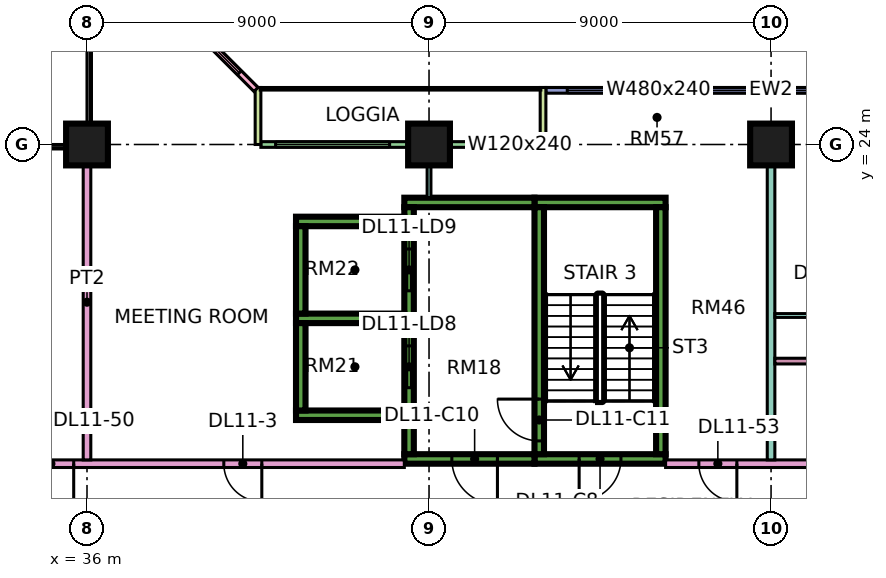
"""IFC4 building model, lengths in metres.
Left out: names, types, materials, properties, quantities, classifications, styles, units other than length and angle.
Written with IfcOpenShell. Run it as: python <this file> out.ifc"""

import sys

from ifc_helpers import new_model, si_unit, direction, frame, frame_2d, origin, origin_2d, place, context, subcontext, project, spatial, rectangle, extrude, element, fill, save


model = new_model("IFC4")
c1 = context("Model", 3, precision=1e-05, world=origin(), true_north=direction((0.0, 1.0)))
c2 = subcontext(c1, "Body", "Model", "MODEL_VIEW")
j1 = project(units=[si_unit("LENGTHUNIT", "METRE"), si_unit("PLANEANGLEUNIT", "RADIAN")], contexts=[c1])
p1 = place(None, origin())
s1 = spatial("IfcSite", under=j1, at=p1, CompositionType="ELEMENT")
p2 = place(p1, origin())
s2 = spatial("IfcBuilding", under=s1, at=p2, CompositionType="ELEMENT")
p3 = place(p2, frame((0.0, 0.0, 56.4)))
s3 = spatial("IfcBuildingStorey", under=s2, at=p3, CompositionType="ELEMENT", Elevation=56.4)
for number, where, z_axis, x_axis in (
    (1, (36.0, 24.0, 0.0), (0.0, 0.0, 1.0), (1.0, 0.0, 0.0)),
    (2, (45.0, 24.0, 0.0), (0.0, 0.0, 1.0), (1.0, 0.0, 0.0)),
    (3, (54.0, 24.0, 0.0), (0.0, 0.0, 1.0), (1.0, 0.0, 0.0)),
):
    element("IfcColumn", number, at=place(p3, frame(where, z_axis=z_axis, x_axis=x_axis)), inside=s3, PredefinedType="COLUMN", context=c2, shape_type="SweptSolid", body=[
        extrude(rectangle(XDim=1.1, YDim=1.1, at=origin_2d()), origin(), (0.0, 0.0, 1.0), 3.75),
    ])
p4 = place(p3, frame((47.775, 15.725, 0.0), z_axis=(0.0, 0.0, 1.0), x_axis=(1.0, 0.0, 0.0)))
e4 = element("IfcWall", 4, at=p4, inside=s3, PredefinedType="SHEAR", context=c2, shape_type="SweptSolid", body=[
    extrude(rectangle(XDim=3.45, YDim=0.25, at=frame_2d((1.725, 0.0))), origin(), (0.0, 0.0, 1.0), 3.75),
])
p5 = place(p4, frame((1.175, 0.0, 0.0)))
e5 = element("IfcOpeningElement", 5, at=p5, cuts=e4, PredefinedType="OPENING", context=c2, shape_type="SweptSolid", body=[
    extrude(rectangle(XDim=1.1, YDim=2.2, at=frame_2d((0.55, 1.1))), frame((0.0, 0.135, 0.0), z_axis=(0.0, -1.0, 0.0), x_axis=(1.0, 0.0, 0.0)), (0.0, 0.0, 1.0), 0.27),
])
p6 = place(p3, frame((47.775, 22.475, 0.0), z_axis=(0.0, 0.0, 1.0), x_axis=(1.0, 0.0, 0.0)))
e6 = element("IfcWall", 6, at=p6, inside=s3, PredefinedType="SHEAR", context=c2, shape_type="SweptSolid", body=[
    extrude(rectangle(XDim=3.45, YDim=0.25, at=frame_2d((1.725, 0.0))), origin(), (0.0, 0.0, 1.0), 3.75),
])
p7 = place(p3, frame((47.9, 15.85, 0.0), z_axis=(0.0, 0.0, 1.0), x_axis=(0.0, 1.0, 0.0)))
e7 = element("IfcWall", 7, at=p7, inside=s3, PredefinedType="SHEAR", context=c2, shape_type="SweptSolid", body=[
    extrude(rectangle(XDim=6.5, YDim=0.25, at=frame_2d((3.25, 0.0))), origin(), (0.0, 0.0, 1.0), 3.75),
])
p8 = place(p7, frame((0.35, 0.0, 0.0)))
e8 = element("IfcOpeningElement", 8, at=p8, cuts=e7, PredefinedType="OPENING", context=c2, shape_type="SweptSolid", body=[
    extrude(rectangle(XDim=1.1, YDim=2.2, at=frame_2d((0.55, 1.1))), frame((0.0, 0.135, 0.0), z_axis=(0.0, -1.0, 0.0), x_axis=(1.0, 0.0, 0.0)), (0.0, 0.0, 1.0), 0.27),
])
p9 = place(p3, frame((51.1, 15.85, 0.0), z_axis=(0.0, 0.0, 1.0), x_axis=(0.0, 1.0, 0.0)))
e9 = element("IfcWall", 9, at=p9, inside=s3, PredefinedType="SHEAR", context=c2, shape_type="SweptSolid", body=[
    extrude(rectangle(XDim=6.5, YDim=0.25, at=frame_2d((3.25, 0.0))), origin(), (0.0, 0.0, 1.0), 3.75),
])
p10 = place(p3, frame((44.35, 15.725, 0.0), z_axis=(0.0, 0.0, 1.0), x_axis=(1.0, 0.0, 0.0)))
e10 = element("IfcWall", 10, at=p10, inside=s3, PredefinedType="SHEAR", context=c2, shape_type="SweptSolid", body=[
    extrude(rectangle(XDim=3.425, YDim=0.25, at=frame_2d((1.712, 0.0))), origin(), (0.0, 0.0, 1.0), 3.75),
])
p11 = place(p10, frame((1.25, 0.0, 0.0)))
e11 = element("IfcOpeningElement", 11, at=p11, cuts=e10, PredefinedType="OPENING", context=c2, shape_type="SweptSolid", body=[
    extrude(rectangle(XDim=1.2, YDim=2.2, at=frame_2d((0.6, 1.1))), frame((0.0, 0.135, 0.0), z_axis=(0.0, -1.0, 0.0), x_axis=(1.0, 0.0, 0.0)), (0.0, 0.0, 1.0), 0.27),
])
p12 = place(p3, frame((44.35, 22.475, 0.0), z_axis=(0.0, 0.0, 1.0), x_axis=(1.0, 0.0, 0.0)))
e12 = element("IfcWall", 12, at=p12, inside=s3, PredefinedType="SHEAR", context=c2, shape_type="SweptSolid", body=[
    extrude(rectangle(XDim=3.425, YDim=0.25, at=frame_2d((1.712, 0.0))), origin(), (0.0, 0.0, 1.0), 3.75),
])
p13 = place(p3, frame((44.475, 15.85, 0.0), z_axis=(0.0, 0.0, 1.0), x_axis=(0.0, 1.0, 0.0)))
e13 = element("IfcWall", 13, at=p13, inside=s3, PredefinedType="SHEAR", context=c2, shape_type="SweptSolid", body=[
    extrude(rectangle(XDim=6.5, YDim=0.25, at=frame_2d((3.25, 0.0))), origin(), (0.0, 0.0, 1.0), 3.75),
])
p14 = place(p13, frame((1.75, 0.0, 0.0)))
e14 = element("IfcOpeningElement", 14, at=p14, cuts=e13, PredefinedType="OPENING", context=c2, shape_type="SweptSolid", body=[
    extrude(rectangle(XDim=1.1, YDim=2.2, at=frame_2d((0.55, 1.1))), frame((0.0, 0.135, 0.0), z_axis=(0.0, -1.0, 0.0), x_axis=(1.0, 0.0, 0.0)), (0.0, 0.0, 1.0), 0.27),
])
p15 = place(p13, frame((4.3, 0.0, 0.0)))
e15 = element("IfcOpeningElement", 15, at=p15, cuts=e13, PredefinedType="OPENING", context=c2, shape_type="SweptSolid", body=[
    extrude(rectangle(XDim=1.1, YDim=2.2, at=frame_2d((0.55, 1.1))), frame((0.0, 0.135, 0.0), z_axis=(0.0, -1.0, 0.0), x_axis=(1.0, 0.0, 0.0)), (0.0, 0.0, 1.0), 0.27),
])
for number, where, z_axis, x_axis in (
    (16, (41.5, 16.875, 0.0), (0.0, 0.0, 1.0), (1.0, 0.0, 0.0)),
    (17, (41.5, 19.425, 0.0), (0.0, 0.0, 1.0), (1.0, 0.0, 0.0)),
    (18, (41.5, 21.975, 0.0), (0.0, 0.0, 1.0), (1.0, 0.0, 0.0)),
):
    element("IfcWall", number, at=place(p3, frame(where, z_axis=z_axis, x_axis=x_axis)), inside=s3, PredefinedType="SHEAR", context=c2, shape_type="SweptSolid", body=[
        extrude(rectangle(XDim=2.85, YDim=0.25, at=frame_2d((1.425, 0.0))), origin(), (0.0, 0.0, 1.0), 3.75),
    ])
for number, where, z_axis, x_axis in (
    (19, (41.625, 17.0, 0.0), (0.0, 0.0, 1.0), (0.0, 1.0, 0.0)),
    (20, (41.625, 19.55, 0.0), (0.0, 0.0, 1.0), (0.0, 1.0, 0.0)),
):
    element("IfcWall", number, at=place(p3, frame(where, z_axis=z_axis, x_axis=x_axis)), inside=s3, PredefinedType="SHEAR", context=c2, shape_type="SweptSolid", body=[
        extrude(rectangle(XDim=2.3, YDim=0.25, at=frame_2d((1.15, 0.0))), origin(), (0.0, 0.0, 1.0), 3.75),
    ])
p16 = place(p3, frame((59.925, 25.425, 0.0), z_axis=(0.0, 0.0, 1.0), x_axis=(-1.0, 0.0, 0.0)))
e21 = element("IfcWall", 21, at=p16, inside=s3, PredefinedType="SOLIDWALL", context=c2, shape_type="SweptSolid", body=[
    extrude(rectangle(XDim=11.85, YDim=0.15, at=frame_2d((5.925, 0.0))), origin(), (0.0, 0.0, 1.0), 3.35),
])
p17 = place(p16, frame((0.562, 0.0, 0.45)))
e22 = element("IfcOpeningElement", 22, at=p17, cuts=e21, PredefinedType="OPENING", context=c2, shape_type="SweptSolid", body=[
    extrude(rectangle(XDim=1.8, YDim=2.4, at=frame_2d((0.9, 1.2))), frame((0.0, 0.085, 0.0), z_axis=(0.0, -1.0, 0.0), x_axis=(1.0, 0.0, 0.0)), (0.0, 0.0, 1.0), 0.17),
])
p18 = place(p16, frame((3.525, 0.0, 0.45)))
e23 = element("IfcOpeningElement", 23, at=p18, cuts=e21, PredefinedType="OPENING", context=c2, shape_type="SweptSolid", body=[
    extrude(rectangle(XDim=1.8, YDim=2.4, at=frame_2d((0.9, 1.2))), frame((0.0, 0.085, 0.0), z_axis=(0.0, -1.0, 0.0), x_axis=(1.0, 0.0, 0.0)), (0.0, 0.0, 1.0), 0.17),
])
p19 = place(p16, frame((6.488, 0.0, 0.45)))
e24 = element("IfcOpeningElement", 24, at=p19, cuts=e21, PredefinedType="OPENING", context=c2, shape_type="SweptSolid", body=[
    extrude(rectangle(XDim=4.8, YDim=2.4, at=frame_2d((2.4, 1.2))), frame((0.0, 0.085, 0.0), z_axis=(0.0, -1.0, 0.0), x_axis=(1.0, 0.0, 0.0)), (0.0, 0.0, 1.0), 0.17),
])
p20 = place(p3, frame((47.925, 24.0, 0.0), z_axis=(0.0, 0.0, 1.0), x_axis=(-1.0, 0.0, 0.0)))
e25 = element("IfcWall", 25, at=p20, inside=s3, PredefinedType="SOLIDWALL", context=c2, shape_type="SweptSolid", body=[
    extrude(rectangle(XDim=7.35, YDim=0.15, at=frame_2d((3.675, 0.0))), origin(), (0.0, 0.0, 1.0), 3.35),
])
p21 = place(p20, frame((0.538, 0.0, 0.45)))
e26 = element("IfcOpeningElement", 26, at=p21, cuts=e25, PredefinedType="OPENING", context=c2, shape_type="SweptSolid", body=[
    extrude(rectangle(XDim=1.2, YDim=2.4, at=frame_2d((0.6, 1.2))), frame((0.0, 0.085, 0.0), z_axis=(0.0, -1.0, 0.0), x_axis=(1.0, 0.0, 0.0)), (0.0, 0.0, 1.0), 0.17),
])
p22 = place(p20, frame((3.962, 0.0, 0.45)))
e27 = element("IfcOpeningElement", 27, at=p22, cuts=e25, PredefinedType="OPENING", context=c2, shape_type="SweptSolid", body=[
    extrude(rectangle(XDim=3.0, YDim=2.4, at=frame_2d((1.5, 1.2))), frame((0.0, 0.085, 0.0), z_axis=(0.0, -1.0, 0.0), x_axis=(1.0, 0.0, 0.0)), (0.0, 0.0, 1.0), 0.17),
])
for number, where, z_axis, x_axis in (
    (28, (48.0, 25.5, 0.0), (0.0, 0.0, 1.0), (0.0, -1.0, 0.0)),
    (29, (40.5, 25.5, 0.0), (0.0, 0.0, 1.0), (0.0, -1.0, 0.0)),
):
    element("IfcWall", number, at=place(p3, frame(where, z_axis=z_axis, x_axis=x_axis)), inside=s3, PredefinedType="SOLIDWALL", context=c2, shape_type="SweptSolid", body=[
        extrude(rectangle(XDim=1.5, YDim=0.15, at=frame_2d((0.75, 0.0))), origin(), (0.0, 0.0, 1.0), 3.35),
    ])
p23 = place(p3, frame((40.447, 25.447, 0.0), z_axis=(0.0, 0.0, 1.0), x_axis=(-0.707106781187, 0.707106781187, 0.0)))
e30 = element("IfcWall", 30, at=p23, inside=s3, PredefinedType="SOLIDWALL", context=c2, shape_type="SweptSolid", body=[
    extrude(rectangle(XDim=4.243, YDim=0.15, at=frame_2d((2.121, 0.0))), origin(), (0.0, 0.0, 1.0), 3.35),
])
p24 = place(p23, frame((0.621, 0.0, 0.45)))
e31 = element("IfcOpeningElement", 31, at=p24, cuts=e30, PredefinedType="OPENING", context=c2, shape_type="SweptSolid", body=[
    extrude(rectangle(XDim=3.0, YDim=2.4, at=frame_2d((1.5, 1.2))), frame((0.0, 0.085, 0.0), z_axis=(0.0, -1.0, 0.0), x_axis=(1.0, 0.0, 0.0)), (0.0, 0.0, 1.0), 0.17),
])
p25 = place(p3, frame((34.0, 15.6, 0.0), z_axis=(0.0, 0.0, 1.0), x_axis=(1.0, 0.0, 0.0)))
e32 = element("IfcWall", 32, at=p25, inside=s3, PredefinedType="PARTITIONING", context=c2, shape_type="SweptSolid", body=[
    extrude(rectangle(XDim=10.35, YDim=0.2, at=frame_2d((5.175, 0.0))), origin(), (0.0, 0.0, 1.0), 3.35),
])
p26 = place(p25, frame((5.6, 0.0, 0.0)))
e33 = element("IfcOpeningElement", 33, at=p26, cuts=e32, PredefinedType="OPENING", context=c2, shape_type="SweptSolid", body=[
    extrude(rectangle(XDim=1.0, YDim=2.1, at=frame_2d((0.5, 1.05))), frame((0.0, 0.11, 0.0), z_axis=(0.0, -1.0, 0.0), x_axis=(1.0, 0.0, 0.0)), (0.0, 0.0, 1.0), 0.22),
])
p27 = place(p25, frame((0.45, 0.0, 0.0)))
e34 = element("IfcOpeningElement", 34, at=p27, cuts=e32, PredefinedType="OPENING", context=c2, shape_type="SweptSolid", body=[
    extrude(rectangle(XDim=1.2, YDim=2.1, at=frame_2d((0.6, 1.05))), frame((0.0, 0.11, 0.0), z_axis=(0.0, -1.0, 0.0), x_axis=(1.0, 0.0, 0.0)), (0.0, 0.0, 1.0), 0.22),
])
p28 = place(p3, frame((36.0, 15.7, 0.0), z_axis=(0.0, 0.0, 1.0), x_axis=(0.0, 1.0, 0.0)))
e35 = element("IfcWall", 35, at=p28, inside=s3, PredefinedType="PARTITIONING", context=c2, shape_type="SweptSolid", body=[
    extrude(rectangle(XDim=8.3, YDim=0.2, at=frame_2d((4.15, 0.0))), origin(), (0.0, 0.0, 1.0), 3.35),
])
p29 = place(p3, frame((45.0, 22.6, 0.0), z_axis=(0.0, 0.0, 1.0), x_axis=(0.0, 1.0, 0.0)))
e36 = element("IfcWall", 36, at=p29, inside=s3, PredefinedType="PARTITIONING", context=c2, shape_type="SweptSolid", body=[
    extrude(rectangle(XDim=1.326, YDim=0.1, at=frame_2d((0.663, 0.0))), origin(), (0.0, 0.0, 1.0), 3.35),
])
p30 = place(p3, frame((51.225, 15.6, 0.0), z_axis=(0.0, 0.0, 1.0), x_axis=(1.0, 0.0, 0.0)))
e37 = element("IfcWall", 37, at=p30, inside=s3, PredefinedType="PARTITIONING", context=c2, shape_type="SweptSolid", body=[
    extrude(rectangle(XDim=20.701, YDim=0.2, at=frame_2d((10.351, 0.0))), origin(), (0.0, 0.0, 1.0), 3.35),
])
p31 = place(p30, frame((12.575, 0.0, 0.0)))
e38 = element("IfcOpeningElement", 38, at=p31, cuts=e37, PredefinedType="OPENING", context=c2, shape_type="SweptSolid", body=[
    extrude(rectangle(XDim=1.0, YDim=2.1, at=frame_2d((0.5, 1.05))), frame((0.0, 0.11, 0.0), z_axis=(0.0, -1.0, 0.0), x_axis=(1.0, 0.0, 0.0)), (0.0, 0.0, 1.0), 0.22),
])
p32 = place(p30, frame((0.875, 0.0, 0.0)))
e39 = element("IfcOpeningElement", 39, at=p32, cuts=e37, PredefinedType="OPENING", context=c2, shape_type="SweptSolid", body=[
    extrude(rectangle(XDim=1.0, YDim=2.1, at=frame_2d((0.5, 1.05))), frame((0.0, 0.11, 0.0), z_axis=(0.0, -1.0, 0.0), x_axis=(1.0, 0.0, 0.0)), (0.0, 0.0, 1.0), 0.22),
])
p33 = place(p3, frame((54.0, 15.7, 0.0), z_axis=(0.0, 0.0, 1.0), x_axis=(0.0, 1.0, 0.0)))
e40 = element("IfcWall", 40, at=p33, inside=s3, PredefinedType="PARTITIONING", context=c2, shape_type="SweptSolid", body=[
    extrude(rectangle(XDim=8.3, YDim=0.2, at=frame_2d((4.15, 0.0))), origin(), (0.0, 0.0, 1.0), 3.35),
])
p34 = place(p3, frame((54.1, 18.3, 0.0), z_axis=(0.0, 0.0, 1.0), x_axis=(1.0, 0.0, 0.0)))
e41 = element("IfcWall", 41, at=p34, inside=s3, PredefinedType="PARTITIONING", context=c2, shape_type="SweptSolid", body=[
    extrude(rectangle(XDim=8.975, YDim=0.15, at=frame_2d((4.487, 0.0))), origin(), (0.0, 0.0, 1.0), 3.35),
])
p35 = place(p34, frame((2.6, 0.0, 0.0)))
e42 = element("IfcOpeningElement", 42, at=p35, cuts=e41, PredefinedType="OPENING", context=c2, shape_type="SweptSolid", body=[
    extrude(rectangle(XDim=0.9, YDim=2.1, at=frame_2d((0.45, 1.05))), frame((0.0, 0.085, 0.0), z_axis=(0.0, -1.0, 0.0), x_axis=(1.0, 0.0, 0.0)), (0.0, 0.0, 1.0), 0.17),
])
p36 = place(p3, frame((54.1, 19.5, 0.0), z_axis=(0.0, 0.0, 1.0), x_axis=(1.0, 0.0, 0.0)))
e43 = element("IfcWall", 43, at=p36, inside=s3, PredefinedType="PARTITIONING", context=c2, shape_type="SweptSolid", body=[
    extrude(rectangle(XDim=8.95, YDim=0.1, at=frame_2d((4.475, 0.0))), origin(), (0.0, 0.0, 1.0), 3.35),
])
p37 = place(p36, frame((0.95, 0.0, 0.0)))
e44 = element("IfcOpeningElement", 44, at=p37, cuts=e43, PredefinedType="OPENING", context=c2, shape_type="SweptSolid", body=[
    extrude(rectangle(XDim=0.9, YDim=2.1, at=frame_2d((0.45, 1.05))), frame((0.0, 0.06, 0.0), z_axis=(0.0, -1.0, 0.0), x_axis=(1.0, 0.0, 0.0)), (0.0, 0.0, 1.0), 0.12),
])
p38 = place(p36, frame((3.95, 0.0, 0.0)))
e45 = element("IfcOpeningElement", 45, at=p38, cuts=e43, PredefinedType="OPENING", context=c2, shape_type="SweptSolid", body=[
    extrude(rectangle(XDim=0.9, YDim=2.1, at=frame_2d((0.45, 1.05))), frame((0.0, 0.06, 0.0), z_axis=(0.0, -1.0, 0.0), x_axis=(1.0, 0.0, 0.0)), (0.0, 0.0, 1.0), 0.12),
])
p39 = place(p36, frame((6.95, 0.0, 0.0)))
e46 = element("IfcOpeningElement", 46, at=p39, cuts=e43, PredefinedType="OPENING", context=c2, shape_type="SweptSolid", body=[
    extrude(rectangle(XDim=0.9, YDim=2.1, at=frame_2d((0.45, 1.05))), frame((0.0, 0.06, 0.0), z_axis=(0.0, -1.0, 0.0), x_axis=(1.0, 0.0, 0.0)), (0.0, 0.0, 1.0), 0.12),
])
p40 = place(p18, origin())
e47 = element("IfcWindow", 47, at=p40, inside=s3, PartitioningType="SINGLE_PANEL", PredefinedType="WINDOW", context=c2, shape_type="SweptSolid", body=[
    extrude(rectangle(XDim=1.8, YDim=2.4, at=frame_2d((0.9, 1.2))), frame((0.0, 0.03, 0.0), z_axis=(0.0, -1.0, 0.0), x_axis=(1.0, 0.0, 0.0)), (0.0, 0.0, 1.0), 0.06),
])
fill(e23, e47)
p41 = place(p19, origin())
e48 = element("IfcWindow", 48, at=p41, inside=s3, PartitioningType="SINGLE_PANEL", PredefinedType="WINDOW", context=c2, shape_type="SweptSolid", body=[
    extrude(rectangle(XDim=4.8, YDim=2.4, at=frame_2d((2.4, 1.2))), frame((0.0, 0.03, 0.0), z_axis=(0.0, -1.0, 0.0), x_axis=(1.0, 0.0, 0.0)), (0.0, 0.0, 1.0), 0.06),
])
fill(e24, e48)
p42 = place(p21, origin())
e49 = element("IfcWindow", 49, at=p42, inside=s3, PartitioningType="SINGLE_PANEL", PredefinedType="WINDOW", context=c2, shape_type="SweptSolid", body=[
    extrude(rectangle(XDim=1.2, YDim=2.4, at=frame_2d((0.6, 1.2))), frame((0.0, 0.03, 0.0), z_axis=(0.0, -1.0, 0.0), x_axis=(1.0, 0.0, 0.0)), (0.0, 0.0, 1.0), 0.06),
])
fill(e26, e49)
p43 = place(p22, origin())
e50 = element("IfcWindow", 50, at=p43, inside=s3, PartitioningType="SINGLE_PANEL", PredefinedType="WINDOW", context=c2, shape_type="SweptSolid", body=[
    extrude(rectangle(XDim=3.0, YDim=2.4, at=frame_2d((1.5, 1.2))), frame((0.0, 0.03, 0.0), z_axis=(0.0, -1.0, 0.0), x_axis=(1.0, 0.0, 0.0)), (0.0, 0.0, 1.0), 0.06),
])
fill(e27, e50)
p44 = place(p24, origin())
e51 = element("IfcWindow", 51, at=p44, inside=s3, PartitioningType="SINGLE_PANEL", PredefinedType="WINDOW", context=c2, shape_type="SweptSolid", body=[
    extrude(rectangle(XDim=3.0, YDim=2.4, at=frame_2d((1.5, 1.2))), frame((0.0, 0.03, 0.0), z_axis=(0.0, -1.0, 0.0), x_axis=(1.0, 0.0, 0.0)), (0.0, 0.0, 1.0), 0.06),
])
fill(e31, e51)
p45 = place(p5, frame((1.1, 0.0, 0.0), z_axis=(0.0, 0.0, 1.0), x_axis=(-1.0, 0.0, 0.0)))
e52 = element("IfcDoor", 52, at=p45, inside=s3, OperationType="SINGLE_SWING_LEFT", PredefinedType="DOOR", context=c2, shape_type="SweptSolid", body=[
    extrude(rectangle(XDim=1.1, YDim=2.2, at=frame_2d((0.55, 1.1))), frame((0.0, 0.025, 0.0), z_axis=(0.0, -1.0, 0.0), x_axis=(1.0, 0.0, 0.0)), (0.0, 0.0, 1.0), 0.05),
])
fill(e5, e52)
p46 = place(p11, origin())
e53 = element("IfcDoor", 53, at=p46, inside=s3, OperationType="SINGLE_SWING_RIGHT", PredefinedType="DOOR", context=c2, shape_type="SweptSolid", body=[
    extrude(rectangle(XDim=1.2, YDim=2.2, at=frame_2d((0.6, 1.1))), frame((0.0, 0.025, 0.0), z_axis=(0.0, -1.0, 0.0), x_axis=(1.0, 0.0, 0.0)), (0.0, 0.0, 1.0), 0.05),
])
fill(e11, e53)
p47 = place(p8, frame((1.1, 0.0, 0.0), z_axis=(0.0, 0.0, 1.0), x_axis=(-1.0, 0.0, 0.0)))
e54 = element("IfcDoor", 54, at=p47, inside=s3, OperationType="SINGLE_SWING_RIGHT", PredefinedType="DOOR", context=c2, shape_type="SweptSolid", body=[
    extrude(rectangle(XDim=1.1, YDim=2.2, at=frame_2d((0.55, 1.1))), frame((0.0, 0.025, 0.0), z_axis=(0.0, -1.0, 0.0), x_axis=(1.0, 0.0, 0.0)), (0.0, 0.0, 1.0), 0.05),
])
fill(e8, e54)
p48 = place(p14, origin())
e55 = element("IfcDoor", 55, at=p48, inside=s3, OperationType="DOUBLE_DOOR_SLIDING", PredefinedType="DOOR", context=c2, shape_type="SweptSolid", body=[
    extrude(rectangle(XDim=1.1, YDim=2.2, at=frame_2d((0.55, 1.1))), frame((0.0, 0.025, 0.0), z_axis=(0.0, -1.0, 0.0), x_axis=(1.0, 0.0, 0.0)), (0.0, 0.0, 1.0), 0.05),
])
fill(e14, e55)
p49 = place(p15, origin())
e56 = element("IfcDoor", 56, at=p49, inside=s3, OperationType="DOUBLE_DOOR_SLIDING", PredefinedType="DOOR", context=c2, shape_type="SweptSolid", body=[
    extrude(rectangle(XDim=1.1, YDim=2.2, at=frame_2d((0.55, 1.1))), frame((0.0, 0.025, 0.0), z_axis=(0.0, -1.0, 0.0), x_axis=(1.0, 0.0, 0.0)), (0.0, 0.0, 1.0), 0.05),
])
fill(e15, e56)
p50 = place(p26, origin())
e57 = element("IfcDoor", 57, at=p50, inside=s3, OperationType="SINGLE_SWING_RIGHT", PredefinedType="DOOR", context=c2, shape_type="SweptSolid", body=[
    extrude(rectangle(XDim=1.0, YDim=2.1, at=frame_2d((0.5, 1.05))), frame((0.0, 0.025, 0.0), z_axis=(0.0, -1.0, 0.0), x_axis=(1.0, 0.0, 0.0)), (0.0, 0.0, 1.0), 0.05),
])
fill(e33, e57)
p51 = place(p27, origin())
e58 = element("IfcDoor", 58, at=p51, inside=s3, OperationType="SINGLE_SWING_RIGHT", PredefinedType="DOOR", context=c2, shape_type="SweptSolid", body=[
    extrude(rectangle(XDim=1.2, YDim=2.1, at=frame_2d((0.6, 1.05))), frame((0.0, 0.025, 0.0), z_axis=(0.0, -1.0, 0.0), x_axis=(1.0, 0.0, 0.0)), (0.0, 0.0, 1.0), 0.05),
])
fill(e34, e58)
p52 = place(p32, origin())
e59 = element("IfcDoor", 59, at=p52, inside=s3, OperationType="SINGLE_SWING_RIGHT", PredefinedType="DOOR", context=c2, shape_type="SweptSolid", body=[
    extrude(rectangle(XDim=1.0, YDim=2.1, at=frame_2d((0.5, 1.05))), frame((0.0, 0.025, 0.0), z_axis=(0.0, -1.0, 0.0), x_axis=(1.0, 0.0, 0.0)), (0.0, 0.0, 1.0), 0.05),
])
fill(e39, e59)
save(model, sys.argv[1])
